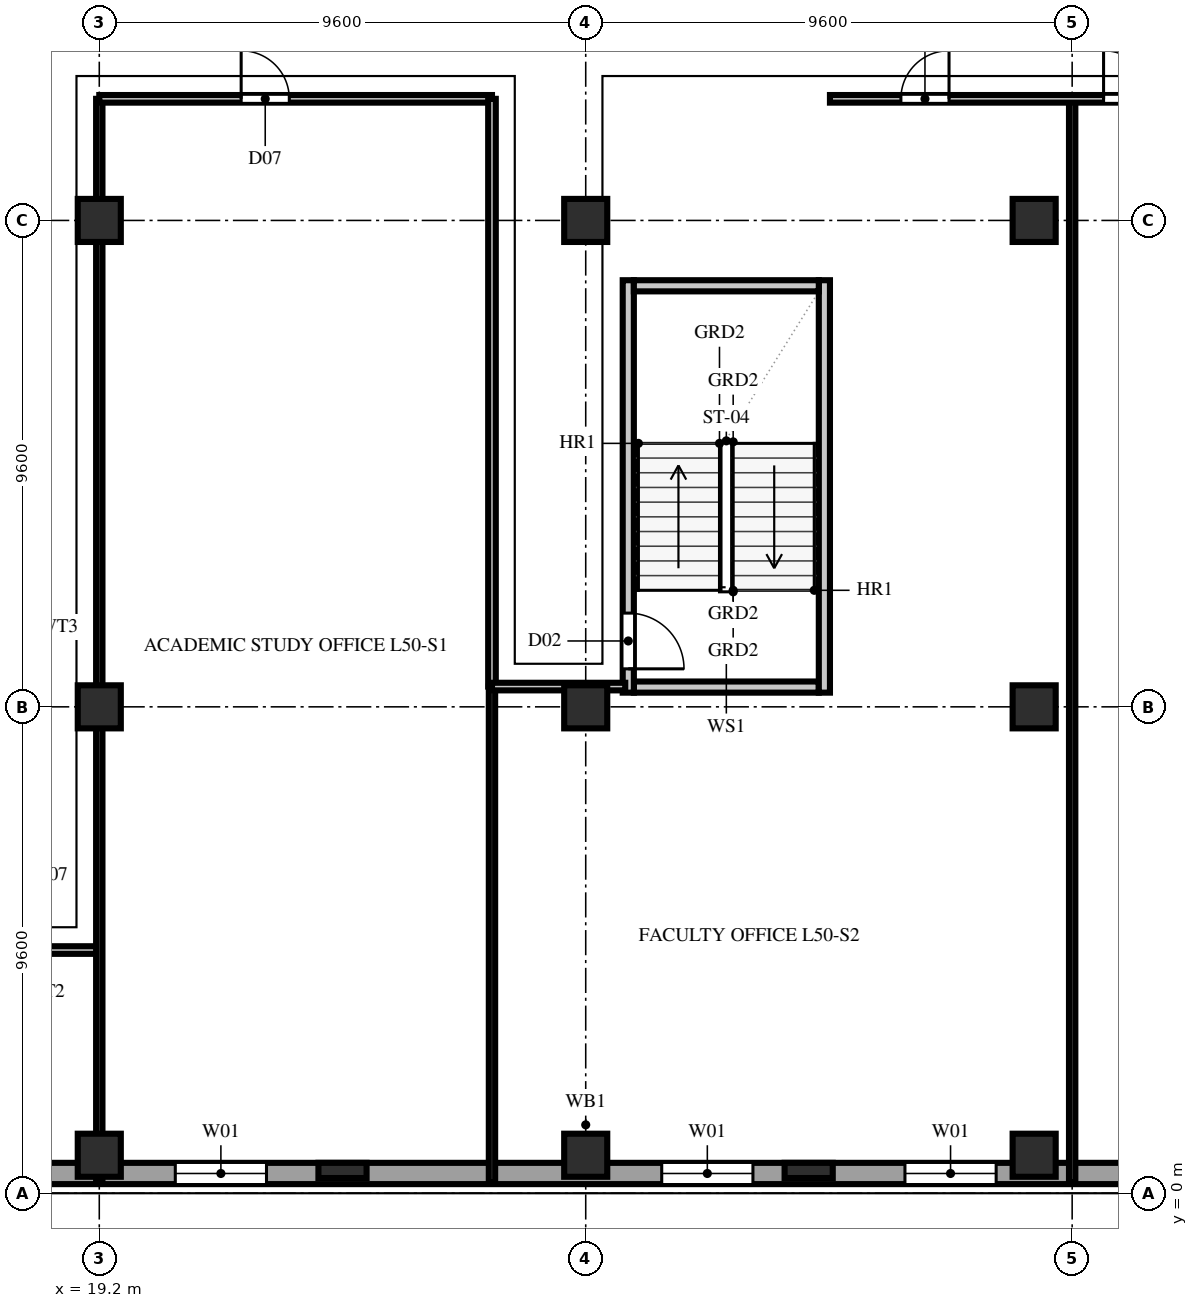
"""IFC4 building model, lengths in metres.
Left out: names, types, materials, properties, quantities, classifications, styles, units other than length and angle.
Written with IfcOpenShell. Run it as: python <this file> out.ifc"""

import sys

from ifc_helpers import new_model, si_unit, direction, frame, frame_2d, origin, origin_2d, place, context, subcontext, project, spatial, rectangle, extrude, element, fill, save


model = new_model("IFC4")
c1 = context("Model", 3, precision=1e-05, world=origin(), true_north=direction((0.0, 1.0)))
c2 = subcontext(c1, "Body", "Model", "MODEL_VIEW")
j1 = project(units=[si_unit("LENGTHUNIT", "METRE"), si_unit("PLANEANGLEUNIT", "RADIAN")], contexts=[c1])
p1 = place(None, origin())
s1 = spatial("IfcSite", under=j1, at=p1, CompositionType="ELEMENT")
p2 = place(p1, origin())
s2 = spatial("IfcBuilding", under=s1, at=p2, CompositionType="ELEMENT")
p3 = place(p2, frame((0.0, 0.0, 199.0)))
s3 = spatial("IfcBuildingStorey", under=s2, at=p3, CompositionType="ELEMENT", Elevation=199.0)
for number, where, z_axis, x_axis in (
    (1, (19.2, 0.75, 0.0), (0.0, 0.0, 1.0), (1.0, 0.0, 0.0)),
    (2, (19.2, 9.6, 0.0), (0.0, 0.0, 1.0), (1.0, 0.0, 0.0)),
    (3, (19.2, 19.2, 0.0), (0.0, 0.0, 1.0), (1.0, 0.0, 0.0)),
    (4, (28.8, 0.75, 0.0), (0.0, 0.0, 1.0), (1.0, 0.0, 0.0)),
    (5, (28.8, 9.6, 0.0), (0.0, 0.0, 1.0), (1.0, 0.0, 0.0)),
    (6, (28.8, 19.2, 0.0), (0.0, 0.0, 1.0), (1.0, 0.0, 0.0)),
    (7, (37.65, 0.75, 0.0), (0.0, 0.0, 1.0), (1.0, 0.0, 0.0)),
    (8, (37.65, 9.6, 0.0), (0.0, 0.0, 1.0), (1.0, 0.0, 0.0)),
    (9, (37.65, 19.2, 0.0), (0.0, 0.0, 1.0), (1.0, 0.0, 0.0)),
):
    element("IfcColumn", number, at=place(p3, frame(where, z_axis=z_axis, x_axis=x_axis)), inside=s3, PredefinedType="COLUMN", context=c2, shape_type="SweptSolid", body=[
        extrude(rectangle(XDim=0.85, YDim=0.85, at=origin_2d()), origin(), (0.0, 0.0, 1.0), 3.8),
    ])
for number, where, z_axis, x_axis in (
    (10, (24.0, 0.45, 0.0), (0.0, 0.0, 1.0), (1.0, 0.0, 0.0)),
    (11, (33.2, 0.45, 0.0), (0.0, 0.0, 1.0), (1.0, 0.0, 0.0)),
):
    element("IfcColumn", number, at=place(p3, frame(where, z_axis=z_axis, x_axis=x_axis)), inside=s3, PredefinedType="PILASTER", context=c2, shape_type="SweptSolid", body=[
        extrude(rectangle(XDim=0.95, YDim=0.3, at=origin_2d()), origin(), (0.0, 0.0, 1.0), 3.8),
    ])
p4 = place(p3, frame((1.84, 0.39, 0.0), z_axis=(0.0, 0.0, 1.0), x_axis=(1.0, 0.0, 0.0)))
e12 = element("IfcWall", 12, at=p4, inside=s3, PredefinedType="SOLIDWALL", context=c2, shape_type="SweptSolid", body=[
    extrude(rectangle(XDim=53.92, YDim=0.42, at=frame_2d((26.96, 0.0))), origin(), (0.0, 0.0, 1.0), 3.54),
])
p5 = place(p4, frame((4.46, 0.0, 0.85)))
e13 = element("IfcOpeningElement", 13, at=p5, cuts=e12, PredefinedType="OPENING", context=c2, shape_type="SweptSolid", body=[
    extrude(rectangle(XDim=1.8, YDim=1.85, at=frame_2d((0.9, 0.925))), frame((0.0, 0.222, 0.0), z_axis=(0.0, -1.0, 0.0), x_axis=(1.0, 0.0, 0.0)), (0.0, 0.0, 1.0), 0.444),
])
p6 = place(p4, frame((9.26, 0.0, 0.85)))
e14 = element("IfcOpeningElement", 14, at=p6, cuts=e12, PredefinedType="OPENING", context=c2, shape_type="SweptSolid", body=[
    extrude(rectangle(XDim=1.8, YDim=1.85, at=frame_2d((0.9, 0.925))), frame((0.0, 0.222, 0.0), z_axis=(0.0, -1.0, 0.0), x_axis=(1.0, 0.0, 0.0)), (0.0, 0.0, 1.0), 0.444),
])
p7 = place(p4, frame((18.86, 0.0, 0.85)))
e15 = element("IfcOpeningElement", 15, at=p7, cuts=e12, PredefinedType="OPENING", context=c2, shape_type="SweptSolid", body=[
    extrude(rectangle(XDim=1.8, YDim=1.85, at=frame_2d((0.9, 0.925))), frame((0.0, 0.222, 0.0), z_axis=(0.0, -1.0, 0.0), x_axis=(1.0, 0.0, 0.0)), (0.0, 0.0, 1.0), 0.444),
])
p8 = place(p4, frame((28.46, 0.0, 0.85)))
e16 = element("IfcOpeningElement", 16, at=p8, cuts=e12, PredefinedType="OPENING", context=c2, shape_type="SweptSolid", body=[
    extrude(rectangle(XDim=1.8, YDim=1.85, at=frame_2d((0.9, 0.925))), frame((0.0, 0.222, 0.0), z_axis=(0.0, -1.0, 0.0), x_axis=(1.0, 0.0, 0.0)), (0.0, 0.0, 1.0), 0.444),
])
p9 = place(p4, frame((33.26, 0.0, 0.85)))
e17 = element("IfcOpeningElement", 17, at=p9, cuts=e12, PredefinedType="OPENING", context=c2, shape_type="SweptSolid", body=[
    extrude(rectangle(XDim=1.8, YDim=1.85, at=frame_2d((0.9, 0.925))), frame((0.0, 0.222, 0.0), z_axis=(0.0, -1.0, 0.0), x_axis=(1.0, 0.0, 0.0)), (0.0, 0.0, 1.0), 0.444),
])
p10 = place(p4, frame((38.06, 0.0, 0.85)))
e18 = element("IfcOpeningElement", 18, at=p10, cuts=e12, PredefinedType="OPENING", context=c2, shape_type="SweptSolid", body=[
    extrude(rectangle(XDim=1.8, YDim=1.85, at=frame_2d((0.9, 0.925))), frame((0.0, 0.222, 0.0), z_axis=(0.0, -1.0, 0.0), x_axis=(1.0, 0.0, 0.0)), (0.0, 0.0, 1.0), 0.444),
])
p11 = place(p4, frame((42.86, 0.0, 0.85)))
e19 = element("IfcOpeningElement", 19, at=p11, cuts=e12, PredefinedType="OPENING", context=c2, shape_type="SweptSolid", body=[
    extrude(rectangle(XDim=1.8, YDim=1.85, at=frame_2d((0.9, 0.925))), frame((0.0, 0.222, 0.0), z_axis=(0.0, -1.0, 0.0), x_axis=(1.0, 0.0, 0.0)), (0.0, 0.0, 1.0), 0.444),
])
p12 = place(p4, frame((47.66, 0.0, 0.85)))
e20 = element("IfcOpeningElement", 20, at=p12, cuts=e12, PredefinedType="OPENING", context=c2, shape_type="SweptSolid", body=[
    extrude(rectangle(XDim=1.8, YDim=1.85, at=frame_2d((0.9, 0.925))), frame((0.0, 0.222, 0.0), z_axis=(0.0, -1.0, 0.0), x_axis=(1.0, 0.0, 0.0)), (0.0, 0.0, 1.0), 0.444),
])
p13 = place(p3, frame((29.75, 9.99, 0.0), z_axis=(0.0, 0.0, 1.0), x_axis=(1.0, 0.0, 0.0)))
e21 = element("IfcWall", 21, at=p13, inside=s3, PredefinedType="SOLIDWALL", context=c2, shape_type="SweptSolid", body=[
    extrude(rectangle(XDim=3.65, YDim=0.22, at=frame_2d((1.825, 0.0))), origin(), (0.0, 0.0, 1.0), 3.54),
])
p14 = place(p3, frame((29.64, 9.88, 0.0), z_axis=(0.0, 0.0, 1.0), x_axis=(0.0, 1.0, 0.0)))
e22 = element("IfcWall", 22, at=p14, inside=s3, PredefinedType="SOLIDWALL", context=c2, shape_type="SweptSolid", body=[
    extrude(rectangle(XDim=8.14, YDim=0.22, at=frame_2d((4.07, 0.0))), origin(), (0.0, 0.0, 1.0), 3.54),
])
p15 = place(p14, frame((0.47, 0.0, 0.0)))
e23 = element("IfcOpeningElement", 23, at=p15, cuts=e22, PredefinedType="OPENING", context=c2, shape_type="SweptSolid", body=[
    extrude(rectangle(XDim=1.1, YDim=2.2, at=frame_2d((0.55, 1.1))), frame((0.0, 0.122, 0.0), z_axis=(0.0, -1.0, 0.0), x_axis=(1.0, 0.0, 0.0)), (0.0, 0.0, 1.0), 0.244),
])
p16 = place(p3, frame((33.51, 9.88, 0.0), z_axis=(0.0, 0.0, 1.0), x_axis=(0.0, 1.0, 0.0)))
e24 = element("IfcWall", 24, at=p16, inside=s3, PredefinedType="SOLIDWALL", context=c2, shape_type="SweptSolid", body=[
    extrude(rectangle(XDim=8.14, YDim=0.22, at=frame_2d((4.07, 0.0))), origin(), (0.0, 0.0, 1.0), 3.54),
])
p17 = place(p3, frame((29.75, 17.91, 0.0), z_axis=(0.0, 0.0, 1.0), x_axis=(1.0, 0.0, 0.0)))
e25 = element("IfcWall", 25, at=p17, inside=s3, PredefinedType="SOLIDWALL", context=c2, shape_type="SweptSolid", body=[
    extrude(rectangle(XDim=3.65, YDim=0.22, at=frame_2d((1.825, 0.0))), origin(), (0.0, 0.0, 1.0), 3.54),
])
p18 = place(p3, frame((17.05, 4.8, 0.0), z_axis=(0.0, 0.0, 1.0), x_axis=(1.0, 0.0, 0.0)))
e26 = element("IfcWall", 26, at=p18, inside=s3, PredefinedType="PARTITIONING", context=c2, shape_type="SweptSolid", body=[
    extrude(rectangle(XDim=2.15, YDim=0.15, at=frame_2d((1.075, 0.0))), origin(), (0.0, 0.0, 1.0), 3.54),
])
p19 = place(p3, frame((19.2, 0.22, 0.0), z_axis=(0.0, 0.0, 1.0), x_axis=(0.0, 1.0, 0.0)))
e27 = element("IfcWall", 27, at=p19, inside=s3, PredefinedType="PARTITIONING", context=c2, shape_type="SweptSolid", body=[
    extrude(rectangle(XDim=0.53, YDim=0.125, at=frame_2d((0.265, 0.0))), origin(), (0.0, 0.0, 1.0), 3.54),
])
p20 = place(p3, frame((19.2, 0.75, 0.0), z_axis=(0.0, 0.0, 1.0), x_axis=(0.0, 1.0, 0.0)))
e28 = element("IfcWall", 28, at=p20, inside=s3, PredefinedType="PARTITIONING", context=c2, shape_type="SweptSolid", body=[
    extrude(rectangle(XDim=20.85, YDim=0.125, at=frame_2d((10.425, 0.0))), origin(), (0.0, 0.0, 1.0), 2.996),
])
p21 = place(p3, frame((19.2, 21.6, 0.0), z_axis=(0.0, 0.0, 1.0), x_axis=(1.0, 0.0, 0.0)))
e29 = element("IfcWall", 29, at=p21, inside=s3, PredefinedType="PARTITIONING", context=c2, shape_type="SweptSolid", body=[
    extrude(rectangle(XDim=7.75, YDim=0.15, at=frame_2d((3.875, 0.0))), origin(), (0.0, 0.0, 1.0), 3.54),
])
p22 = place(p21, frame((2.8, 0.0, 0.0)))
e30 = element("IfcOpeningElement", 30, at=p22, cuts=e29, PredefinedType="OPENING", context=c2, shape_type="SweptSolid", body=[
    extrude(rectangle(XDim=0.95, YDim=2.15, at=frame_2d((0.475, 1.075))), frame((0.0, 0.087, 0.0), z_axis=(0.0, -1.0, 0.0), x_axis=(1.0, 0.0, 0.0)), (0.0, 0.0, 1.0), 0.174),
])
p23 = place(p3, frame((26.95, 0.22, 0.0), z_axis=(0.0, 0.0, 1.0), x_axis=(0.0, 1.0, 0.0)))
e31 = element("IfcWall", 31, at=p23, inside=s3, PredefinedType="PARTITIONING", context=c2, shape_type="SweptSolid", body=[
    extrude(rectangle(XDim=9.78, YDim=0.125, at=frame_2d((4.89, 0.0))), origin(), (0.0, 0.0, 1.0), 3.54),
])
p24 = place(p3, frame((26.95, 10.0, 0.0), z_axis=(0.0, 0.0, 1.0), x_axis=(0.0, 1.0, 0.0)))
e32 = element("IfcWall", 32, at=p24, inside=s3, PredefinedType="PARTITIONING", context=c2, shape_type="SweptSolid", body=[
    extrude(rectangle(XDim=11.6, YDim=0.15, at=frame_2d((5.8, 0.0))), origin(), (0.0, 0.0, 1.0), 3.54),
])
p25 = place(p3, frame((26.95, 10.0, 0.0), z_axis=(0.0, 0.0, 1.0), x_axis=(1.0, 0.0, 0.0)))
e33 = element("IfcWall", 33, at=p25, inside=s3, PredefinedType="PARTITIONING", context=c2, shape_type="SweptSolid", body=[
    extrude(rectangle(XDim=2.63, YDim=0.15, at=frame_2d((1.315, 0.0))), origin(), (0.0, 0.0, 1.0), 3.54),
])
p26 = place(p3, frame((38.4, 0.22, 0.0), z_axis=(0.0, 0.0, 1.0), x_axis=(0.0, 1.0, 0.0)))
e34 = element("IfcWall", 34, at=p26, inside=s3, PredefinedType="PARTITIONING", context=c2, shape_type="SweptSolid", body=[
    extrude(rectangle(XDim=21.38, YDim=0.125, at=frame_2d((10.69, 0.0))), origin(), (0.0, 0.0, 1.0), 3.54),
])
p27 = place(p3, frame((33.62, 21.6, 0.0), z_axis=(0.0, 0.0, 1.0), x_axis=(1.0, 0.0, 0.0)))
e35 = element("IfcWall", 35, at=p27, inside=s3, PredefinedType="PARTITIONING", context=c2, shape_type="SweptSolid", body=[
    extrude(rectangle(XDim=23.76, YDim=0.15, at=frame_2d((11.88, 0.0))), origin(), (0.0, 0.0, 1.0), 3.54),
])
p28 = place(p27, frame((1.4, 0.0, 0.0)))
e36 = element("IfcOpeningElement", 36, at=p28, cuts=e35, PredefinedType="OPENING", context=c2, shape_type="SweptSolid", body=[
    extrude(rectangle(XDim=0.95, YDim=2.15, at=frame_2d((0.475, 1.075))), frame((0.0, 0.087, 0.0), z_axis=(0.0, -1.0, 0.0), x_axis=(1.0, 0.0, 0.0)), (0.0, 0.0, 1.0), 0.174),
])
p29 = place(p27, frame((5.4, 0.0, 0.0)))
e37 = element("IfcOpeningElement", 37, at=p29, cuts=e35, PredefinedType="OPENING", context=c2, shape_type="SweptSolid", body=[
    extrude(rectangle(XDim=0.95, YDim=2.15, at=frame_2d((0.475, 1.075))), frame((0.0, 0.087, 0.0), z_axis=(0.0, -1.0, 0.0), x_axis=(1.0, 0.0, 0.0)), (0.0, 0.0, 1.0), 0.174),
])
p30 = place(p7, origin())
e38 = element("IfcWindow", 38, at=p30, inside=s3, PartitioningType="DOUBLE_PANEL_VERTICAL", PredefinedType="WINDOW", context=c2, shape_type="SweptSolid", body=[
    extrude(rectangle(XDim=1.8, YDim=1.85, at=frame_2d((0.9, 0.925))), frame((0.0, 0.11, 0.0), z_axis=(0.0, -1.0, 0.0), x_axis=(1.0, 0.0, 0.0)), (0.0, 0.0, 1.0), 0.06),
])
fill(e15, e38)
p31 = place(p8, origin())
e39 = element("IfcWindow", 39, at=p31, inside=s3, PartitioningType="DOUBLE_PANEL_VERTICAL", PredefinedType="WINDOW", context=c2, shape_type="SweptSolid", body=[
    extrude(rectangle(XDim=1.8, YDim=1.85, at=frame_2d((0.9, 0.925))), frame((0.0, 0.11, 0.0), z_axis=(0.0, -1.0, 0.0), x_axis=(1.0, 0.0, 0.0)), (0.0, 0.0, 1.0), 0.06),
])
fill(e16, e39)
p32 = place(p9, origin())
e40 = element("IfcWindow", 40, at=p32, inside=s3, PartitioningType="DOUBLE_PANEL_VERTICAL", PredefinedType="WINDOW", context=c2, shape_type="SweptSolid", body=[
    extrude(rectangle(XDim=1.8, YDim=1.85, at=frame_2d((0.9, 0.925))), frame((0.0, 0.11, 0.0), z_axis=(0.0, -1.0, 0.0), x_axis=(1.0, 0.0, 0.0)), (0.0, 0.0, 1.0), 0.06),
])
fill(e17, e40)
p33 = place(p15, frame((1.1, 0.0, 0.0), z_axis=(0.0, 0.0, 1.0), x_axis=(-1.0, 0.0, 0.0)))
e41 = element("IfcDoor", 41, at=p33, inside=s3, OperationType="SINGLE_SWING_RIGHT", PredefinedType="DOOR", context=c2, shape_type="SweptSolid", body=[
    extrude(rectangle(XDim=1.1, YDim=2.2, at=frame_2d((0.55, 1.1))), frame((0.0, 0.025, 0.0), z_axis=(0.0, -1.0, 0.0), x_axis=(1.0, 0.0, 0.0)), (0.0, 0.0, 1.0), 0.05),
])
fill(e23, e41)
p34 = place(p22, origin())
e42 = element("IfcDoor", 42, at=p34, inside=s3, OperationType="SINGLE_SWING_LEFT", PredefinedType="DOOR", context=c2, shape_type="SweptSolid", body=[
    extrude(rectangle(XDim=0.95, YDim=2.15, at=frame_2d((0.475, 1.075))), frame((0.0, 0.025, 0.0), z_axis=(0.0, -1.0, 0.0), x_axis=(1.0, 0.0, 0.0)), (0.0, 0.0, 1.0), 0.05),
])
fill(e30, e42)
p35 = place(p28, origin())
e43 = element("IfcDoor", 43, at=p35, inside=s3, OperationType="SINGLE_SWING_RIGHT", PredefinedType="DOOR", context=c2, shape_type="SweptSolid", body=[
    extrude(rectangle(XDim=0.95, YDim=2.15, at=frame_2d((0.475, 1.075))), frame((0.0, 0.025, 0.0), z_axis=(0.0, -1.0, 0.0), x_axis=(1.0, 0.0, 0.0)), (0.0, 0.0, 1.0), 0.05),
])
fill(e36, e43)
p36 = place(p29, origin())
e44 = element("IfcDoor", 44, at=p36, inside=s3, OperationType="SINGLE_SWING_LEFT", PredefinedType="DOOR", context=c2, shape_type="SweptSolid", body=[
    extrude(rectangle(XDim=0.95, YDim=2.15, at=frame_2d((0.475, 1.075))), frame((0.0, 0.025, 0.0), z_axis=(0.0, -1.0, 0.0), x_axis=(1.0, 0.0, 0.0)), (0.0, 0.0, 1.0), 0.05),
])
fill(e37, e44)
save(model, sys.argv[1])
